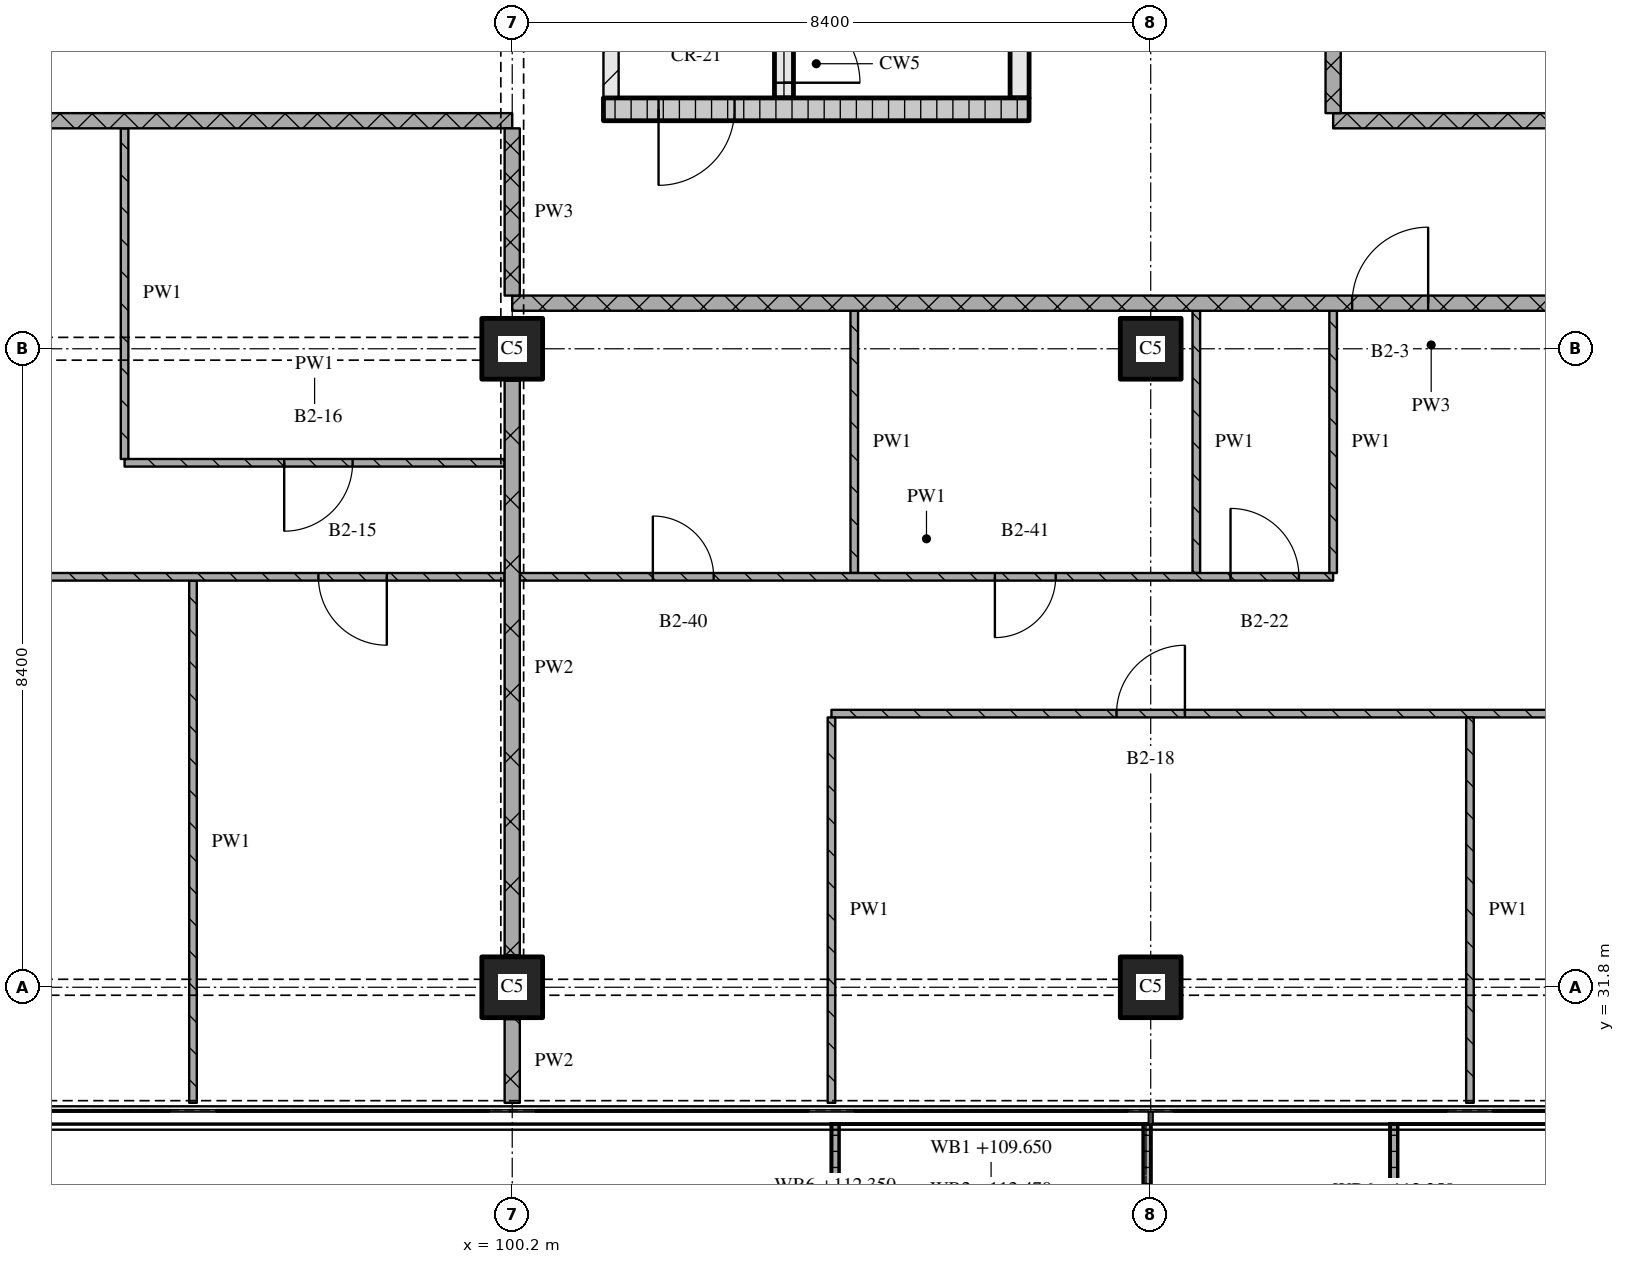
"""IFC4 building model, lengths in metres.
Left out: names, types, materials, properties, quantities, classifications, styles, units other than length and angle.
Written with IfcOpenShell. Run it as: python <this file> out.ifc"""

import sys

from ifc_helpers import new_model, si_unit, direction, frame, frame_2d, origin, origin_2d, place, context, subcontext, project, spatial, polyline, rectangle, outline, extrude, element, fill, save


model = new_model("IFC4")
c1 = context("Model", 3, precision=1e-05, world=origin(), true_north=direction((0.0, 1.0)))
c2 = subcontext(c1, "Body", "Model", "MODEL_VIEW")
j1 = project(units=[si_unit("LENGTHUNIT", "METRE"), si_unit("PLANEANGLEUNIT", "RADIAN")], contexts=[c1])
p1 = place(None, origin())
s1 = spatial("IfcSite", under=j1, at=p1, CompositionType="ELEMENT")
p2 = place(p1, origin())
s2 = spatial("IfcBuilding", under=s1, at=p2, CompositionType="ELEMENT")
p3 = place(p2, frame((0.0, 0.0, 109.65)))
s3 = spatial("IfcBuildingStorey", under=s2, at=p3, CompositionType="ELEMENT", Elevation=109.65)
for number, where, z_axis, x_axis in (
    (1, (100.2, 31.8, 0.0), (0.0, 0.0, 1.0), (1.0, 0.0, 0.0)),
    (2, (100.2, 40.2, 0.0), (0.0, 0.0, 1.0), (1.0, 0.0, 0.0)),
    (3, (108.6, 31.8, 0.0), (0.0, 0.0, 1.0), (1.0, 0.0, 0.0)),
    (4, (108.6, 40.2, 0.0), (0.0, 0.0, 1.0), (1.0, 0.0, 0.0)),
):
    element("IfcColumn", number, at=place(p3, frame(where, z_axis=z_axis, x_axis=x_axis)), inside=s3, PredefinedType="COLUMN", context=c2, shape_type="SweptSolid", body=[
        extrude(rectangle(XDim=0.8, YDim=0.8, at=origin_2d()), origin(), (0.0, 0.0, 1.0), 3.6),
    ])
p4 = place(p3, origin())
e5 = element("IfcWall", 5, at=p4, inside=s3, PredefinedType="SOLIDWALL", context=c2, shape_type="SweptSolid", body=[
    extrude(outline(polyline([(104.4, 30.0), (104.5, 30.0), (104.5, 28.367), (108.5, 28.367), (108.5, 30.0), (108.6, 30.0), (108.6, 28.267), (104.4, 28.267), (104.4, 30.0)])), origin(), (0.0, 0.0, 1.0), 1.0),
])
p5 = place(p3, origin())
e6 = element("IfcWall", 6, at=p5, inside=s3, PredefinedType="SOLIDWALL", context=c2, shape_type="SweptSolid", body=[
    extrude(outline(polyline([(111.75, 30.0), (111.85, 30.0), (111.85, 28.233), (117.95, 28.233), (117.95, 30.0), (118.05, 30.0), (118.05, 28.133), (111.75, 28.133), (111.75, 30.0)])), origin(), (0.0, 0.0, 1.0), 1.0),
])
p6 = place(p3, frame((101.4, 43.35, 0.0), z_axis=(0.0, 0.0, 1.0), x_axis=(1.0, 0.0, 0.0)))
e7 = element("IfcWall", 7, at=p6, inside=s3, PredefinedType="SOLIDWALL", context=c2, shape_type="SweptSolid", body=[
    extrude(rectangle(XDim=5.6, YDim=0.3, at=frame_2d((2.8, 0.0))), origin(), (0.0, 0.0, 1.0), 3.32),
])
p7 = place(p6, frame((0.725, 0.0, 0.0)))
e8 = element("IfcOpeningElement", 8, at=p7, cuts=e7, PredefinedType="OPENING", context=c2, shape_type="SweptSolid", body=[
    extrude(rectangle(XDim=1.0, YDim=2.1, at=frame_2d((0.5, 1.05))), frame((0.0, 0.16, 0.0), z_axis=(0.0, -1.0, 0.0), x_axis=(1.0, 0.0, 0.0)), (0.0, 0.0, 1.0), 0.32),
])
p8 = place(p3, frame((101.5, 43.5, 0.0), z_axis=(0.0, 0.0, 1.0), x_axis=(0.0, 1.0, 0.0)))
e9 = element("IfcWall", 9, at=p8, inside=s3, PredefinedType="PARTITIONING", context=c2, shape_type="SweptSolid", body=[
    extrude(rectangle(XDim=6.9, YDim=0.2, at=frame_2d((3.45, 0.0))), origin(), (0.0, 0.0, 1.0), 3.32),
])
p9 = place(p8, frame((1.0, 0.0, 0.0)))
e10 = element("IfcOpeningElement", 10, at=p9, cuts=e9, PredefinedType="OPENING", context=c2, shape_type="SweptSolid", body=[
    extrude(rectangle(XDim=1.0, YDim=2.1, at=frame_2d((0.5, 1.05))), frame((0.0, 0.11, 0.0), z_axis=(0.0, -1.0, 0.0), x_axis=(1.0, 0.0, 0.0)), (0.0, 0.0, 1.0), 0.22),
])
p10 = place(p3, frame((103.775, 43.5, 0.0), z_axis=(0.0, 0.0, 1.0), x_axis=(0.0, 1.0, 0.0)))
e11 = element("IfcWall", 11, at=p10, inside=s3, PredefinedType="SOLIDWALL", context=c2, shape_type="SweptSolid", body=[
    extrude(rectangle(XDim=6.9, YDim=0.25, at=frame_2d((3.45, 0.0))), origin(), (0.0, 0.0, 1.0), 3.32),
])
p11 = place(p10, frame((0.2, 0.0, 0.0)))
e12 = element("IfcOpeningElement", 12, at=p11, cuts=e11, PredefinedType="OPENING", context=c2, shape_type="SweptSolid", body=[
    extrude(rectangle(XDim=1.0, YDim=2.1, at=frame_2d((0.5, 1.05))), frame((0.0, 0.135, 0.0), z_axis=(0.0, -1.0, 0.0), x_axis=(1.0, 0.0, 0.0)), (0.0, 0.0, 1.0), 0.27),
])
p12 = place(p3, frame((106.875, 43.5, 0.0), z_axis=(0.0, 0.0, 1.0), x_axis=(0.0, 1.0, 0.0)))
e13 = element("IfcWall", 13, at=p12, inside=s3, PredefinedType="SOLIDWALL", context=c2, shape_type="SweptSolid", body=[
    extrude(rectangle(XDim=6.9, YDim=0.25, at=frame_2d((3.45, 0.0))), origin(), (0.0, 0.0, 1.0), 3.32),
])
p13 = place(p3, frame((126.92, 35.4, 0.0), z_axis=(0.0, 0.0, 1.0), x_axis=(-1.0, 0.0, 0.0)))
e14 = element("IfcWall", 14, at=p13, inside=s3, PredefinedType="PARTITIONING", context=c2, shape_type="SweptSolid", body=[
    extrude(rectangle(XDim=22.52, YDim=0.1, at=frame_2d((11.26, 0.0))), origin(), (0.0, 0.0, 1.0), 3.32),
])
p14 = place(p13, frame((3.346, 0.0, 0.0)))
e15 = element("IfcOpeningElement", 15, at=p14, cuts=e14, PredefinedType="OPENING", context=c2, shape_type="SweptSolid", body=[
    extrude(rectangle(XDim=0.9, YDim=2.1, at=frame_2d((0.45, 1.05))), frame((0.0, 0.06, 0.0), z_axis=(0.0, -1.0, 0.0), x_axis=(1.0, 0.0, 0.0)), (0.0, 0.0, 1.0), 0.12),
])
p15 = place(p13, frame((9.47, 0.0, 0.0)))
e16 = element("IfcOpeningElement", 16, at=p15, cuts=e14, PredefinedType="OPENING", context=c2, shape_type="SweptSolid", body=[
    extrude(rectangle(XDim=0.9, YDim=2.1, at=frame_2d((0.45, 1.05))), frame((0.0, 0.06, 0.0), z_axis=(0.0, -1.0, 0.0), x_axis=(1.0, 0.0, 0.0)), (0.0, 0.0, 1.0), 0.12),
])
p16 = place(p13, frame((17.87, 0.0, 0.0)))
e17 = element("IfcOpeningElement", 17, at=p16, cuts=e14, PredefinedType="OPENING", context=c2, shape_type="SweptSolid", body=[
    extrude(rectangle(XDim=0.9, YDim=2.1, at=frame_2d((0.45, 1.05))), frame((0.0, 0.06, 0.0), z_axis=(0.0, -1.0, 0.0), x_axis=(1.0, 0.0, 0.0)), (0.0, 0.0, 1.0), 0.12),
])
p17 = place(p3, frame((95.1, 38.7, 0.0), z_axis=(0.0, 0.0, 1.0), x_axis=(1.0, 0.0, 0.0)))
e18 = element("IfcWall", 18, at=p17, inside=s3, PredefinedType="PARTITIONING", context=c2, shape_type="SweptSolid", body=[
    extrude(rectangle(XDim=5.0, YDim=0.1, at=frame_2d((2.5, 0.0))), origin(), (0.0, 0.0, 1.0), 3.32),
])
p18 = place(p17, frame((2.1, 0.0, 0.0)))
e19 = element("IfcOpeningElement", 19, at=p18, cuts=e18, PredefinedType="OPENING", context=c2, shape_type="SweptSolid", body=[
    extrude(rectangle(XDim=0.9, YDim=2.1, at=frame_2d((0.45, 1.05))), frame((0.0, 0.06, 0.0), z_axis=(0.0, -1.0, 0.0), x_axis=(1.0, 0.0, 0.0)), (0.0, 0.0, 1.0), 0.12),
])
p19 = place(p3, frame((124.38, 40.8, 0.0), z_axis=(0.0, 0.0, 1.0), x_axis=(-1.0, 0.0, 0.0)))
e20 = element("IfcWall", 20, at=p19, inside=s3, PredefinedType="PARTITIONING", context=c2, shape_type="SweptSolid", body=[
    extrude(rectangle(XDim=24.18, YDim=0.2, at=frame_2d((12.09, 0.0))), origin(), (0.0, 0.0, 1.0), 3.32),
])
p20 = place(p19, frame((12.13, 0.0, 0.0)))
e21 = element("IfcOpeningElement", 21, at=p20, cuts=e20, PredefinedType="OPENING", context=c2, shape_type="SweptSolid", body=[
    extrude(rectangle(XDim=1.0, YDim=2.1, at=frame_2d((0.5, 1.05))), frame((0.0, 0.11, 0.0), z_axis=(0.0, -1.0, 0.0), x_axis=(1.0, 0.0, 0.0)), (0.0, 0.0, 1.0), 0.22),
])
p21 = place(p3, frame((100.2, 43.2, 0.0), z_axis=(0.0, 0.0, 1.0), x_axis=(-1.0, 0.0, 0.0)))
e22 = element("IfcWall", 22, at=p21, inside=s3, PredefinedType="PARTITIONING", context=c2, shape_type="SweptSolid", body=[
    extrude(rectangle(XDim=25.2, YDim=0.2, at=frame_2d((12.6, 0.0))), origin(), (0.0, 0.0, 1.0), 3.32),
])
p22 = place(p21, frame((12.85, 0.0, 0.0)))
e23 = element("IfcOpeningElement", 23, at=p22, cuts=e22, PredefinedType="OPENING", context=c2, shape_type="SweptSolid", body=[
    extrude(rectangle(XDim=1.0, YDim=2.1, at=frame_2d((0.5, 1.05))), frame((0.0, 0.11, 0.0), z_axis=(0.0, -1.0, 0.0), x_axis=(1.0, 0.0, 0.0)), (0.0, 0.0, 1.0), 0.22),
])
p23 = place(p3, frame((111.0, 43.2, 0.0), z_axis=(0.0, 0.0, 1.0), x_axis=(1.0, 0.0, 0.0)))
e24 = element("IfcWall", 24, at=p23, inside=s3, PredefinedType="PARTITIONING", context=c2, shape_type="SweptSolid", body=[
    extrude(rectangle(XDim=15.92, YDim=0.2, at=frame_2d((7.96, 0.0))), origin(), (0.0, 0.0, 1.0), 3.32),
])
p24 = place(p3, frame((95.1, 43.1, 0.0), z_axis=(0.0, 0.0, 1.0), x_axis=(0.0, -1.0, 0.0)))
e25 = element("IfcWall", 25, at=p24, inside=s3, PredefinedType="PARTITIONING", context=c2, shape_type="SweptSolid", body=[
    extrude(rectangle(XDim=4.35, YDim=0.1, at=frame_2d((2.175, 0.0))), origin(), (0.0, 0.0, 1.0), 3.32),
])
p25 = place(p3, frame((96.0, 37.15, 0.0), z_axis=(0.0, 0.0, 1.0), x_axis=(0.0, -1.0, 0.0)))
e26 = element("IfcWall", 26, at=p25, inside=s3, PredefinedType="PARTITIONING", context=c2, shape_type="SweptSolid", body=[
    extrude(rectangle(XDim=6.87, YDim=0.1, at=frame_2d((3.435, 0.0))), origin(), (0.0, 0.0, 1.0), 3.32),
])
p26 = place(p3, frame((100.2, 43.1, 0.0), z_axis=(0.0, 0.0, 1.0), x_axis=(0.0, -1.0, 0.0)))
e27 = element("IfcWall", 27, at=p26, inside=s3, PredefinedType="PARTITIONING", context=c2, shape_type="SweptSolid", body=[
    extrude(rectangle(XDim=2.2, YDim=0.2, at=frame_2d((1.1, 0.0))), origin(), (0.0, 0.0, 1.0), 2.43),
])
p27 = place(p3, frame((100.2, 31.38, 0.0), z_axis=(0.0, 0.0, 1.0), x_axis=(0.0, -1.0, 0.0)))
e28 = element("IfcWall", 28, at=p27, inside=s3, PredefinedType="PARTITIONING", context=c2, shape_type="SweptSolid", body=[
    extrude(rectangle(XDim=1.1, YDim=0.2, at=frame_2d((0.55, 0.0))), origin(), (0.0, 0.0, 1.0), 3.32),
])
p28 = place(p3, frame((100.2, 39.78, 0.0), z_axis=(0.0, 0.0, 1.0), x_axis=(0.0, -1.0, 0.0)))
e29 = element("IfcWall", 29, at=p28, inside=s3, PredefinedType="PARTITIONING", context=c2, shape_type="SweptSolid", body=[
    extrude(rectangle(XDim=7.56, YDim=0.2, at=frame_2d((3.78, 0.0))), origin(), (0.0, 0.0, 1.0), 2.83),
])
p29 = place(p3, frame((104.4, 35.35, 0.0), z_axis=(0.0, 0.0, 1.0), x_axis=(0.0, -1.0, 0.0)))
e30 = element("IfcWall", 30, at=p29, inside=s3, PredefinedType="PARTITIONING", context=c2, shape_type="SweptSolid", body=[
    extrude(rectangle(XDim=5.07, YDim=0.1, at=frame_2d((2.535, 0.0))), origin(), (0.0, 0.0, 1.0), 3.32),
])
for number, where, z_axis, x_axis in (
    (31, (104.7, 40.7, 0.0), (0.0, 0.0, 1.0), (0.0, -1.0, 0.0)),
    (32, (109.2, 40.7, 0.0), (0.0, 0.0, 1.0), (0.0, -1.0, 0.0)),
):
    element("IfcWall", number, at=place(p3, frame(where, z_axis=z_axis, x_axis=x_axis)), inside=s3, PredefinedType="PARTITIONING", context=c2, shape_type="SweptSolid", body=[
        extrude(rectangle(XDim=3.45, YDim=0.1, at=frame_2d((1.725, 0.0))), origin(), (0.0, 0.0, 1.0), 3.32),
    ])
p30 = place(p3, frame((111.0, 75.32, 0.0), z_axis=(0.0, 0.0, 1.0), x_axis=(0.0, -1.0, 0.0)))
e33 = element("IfcWall", 33, at=p30, inside=s3, PredefinedType="PARTITIONING", context=c2, shape_type="SweptSolid", body=[
    extrude(rectangle(XDim=32.02, YDim=0.2, at=frame_2d((16.01, 0.0))), origin(), (0.0, 0.0, 1.0), 3.32),
])
p31 = place(p30, frame((3.87, 0.0, 0.0)))
e34 = element("IfcOpeningElement", 34, at=p31, cuts=e33, PredefinedType="OPENING", context=c2, shape_type="SweptSolid", body=[
    extrude(rectangle(XDim=1.0, YDim=2.1, at=frame_2d((0.5, 1.05))), frame((0.0, 0.11, 0.0), z_axis=(0.0, -1.0, 0.0), x_axis=(1.0, 0.0, 0.0)), (0.0, 0.0, 1.0), 0.22),
])
p32 = place(p30, frame((20.67, 0.0, 0.0)))
e35 = element("IfcOpeningElement", 35, at=p32, cuts=e33, PredefinedType="OPENING", context=c2, shape_type="SweptSolid", body=[
    extrude(rectangle(XDim=1.0, YDim=2.1, at=frame_2d((0.5, 1.05))), frame((0.0, 0.11, 0.0), z_axis=(0.0, -1.0, 0.0), x_axis=(1.0, 0.0, 0.0)), (0.0, 0.0, 1.0), 0.22),
])
p33 = place(p3, frame((111.0, 40.7, 0.0), z_axis=(0.0, 0.0, 1.0), x_axis=(0.0, -1.0, 0.0)))
e36 = element("IfcWall", 36, at=p33, inside=s3, PredefinedType="PARTITIONING", context=c2, shape_type="SweptSolid", body=[
    extrude(rectangle(XDim=3.45, YDim=0.1, at=frame_2d((1.725, 0.0))), origin(), (0.0, 0.0, 1.0), 3.32),
])
p34 = place(p3, frame((112.8, 35.35, 0.0), z_axis=(0.0, 0.0, 1.0), x_axis=(0.0, -1.0, 0.0)))
e37 = element("IfcWall", 37, at=p34, inside=s3, PredefinedType="PARTITIONING", context=c2, shape_type="SweptSolid", body=[
    extrude(rectangle(XDim=5.07, YDim=0.1, at=frame_2d((2.535, 0.0))), origin(), (0.0, 0.0, 1.0), 3.32),
])
p35 = place(p3, frame((100.1, 37.2, 0.0), z_axis=(0.0, 0.0, 1.0), x_axis=(-1.0, 0.0, 0.0)))
e38 = element("IfcWall", 38, at=p35, inside=s3, PredefinedType="PARTITIONING", context=c2, shape_type="SweptSolid", body=[
    extrude(rectangle(XDim=12.5, YDim=0.1, at=frame_2d((6.25, 0.0))), origin(), (0.0, 0.0, 1.0), 3.32),
])
p36 = place(p35, frame((1.55, 0.0, 0.0)))
e39 = element("IfcOpeningElement", 39, at=p36, cuts=e38, PredefinedType="OPENING", context=c2, shape_type="SweptSolid", body=[
    extrude(rectangle(XDim=0.9, YDim=2.1, at=frame_2d((0.45, 1.05))), frame((0.0, 0.06, 0.0), z_axis=(0.0, -1.0, 0.0), x_axis=(1.0, 0.0, 0.0)), (0.0, 0.0, 1.0), 0.12),
])
p37 = place(p35, frame((7.85, 0.0, 0.0)))
e40 = element("IfcOpeningElement", 40, at=p37, cuts=e38, PredefinedType="OPENING", context=c2, shape_type="SweptSolid", body=[
    extrude(rectangle(XDim=0.9, YDim=2.1, at=frame_2d((0.45, 1.05))), frame((0.0, 0.06, 0.0), z_axis=(0.0, -1.0, 0.0), x_axis=(1.0, 0.0, 0.0)), (0.0, 0.0, 1.0), 0.12),
])
p38 = place(p3, frame((100.3, 37.2, 0.0), z_axis=(0.0, 0.0, 1.0), x_axis=(1.0, 0.0, 0.0)))
e41 = element("IfcWall", 41, at=p38, inside=s3, PredefinedType="PARTITIONING", context=c2, shape_type="SweptSolid", body=[
    extrude(rectangle(XDim=10.7, YDim=0.1, at=frame_2d((5.35, 0.0))), origin(), (0.0, 0.0, 1.0), 3.32),
])
p39 = place(p38, frame((1.75, 0.0, 0.0)))
e42 = element("IfcOpeningElement", 42, at=p39, cuts=e41, PredefinedType="OPENING", context=c2, shape_type="SweptSolid", body=[
    extrude(rectangle(XDim=0.8, YDim=2.1, at=frame_2d((0.4, 1.05))), frame((0.0, 0.06, 0.0), z_axis=(0.0, -1.0, 0.0), x_axis=(1.0, 0.0, 0.0)), (0.0, 0.0, 1.0), 0.12),
])
p40 = place(p38, frame((6.25, 0.0, 0.0)))
e43 = element("IfcOpeningElement", 43, at=p40, cuts=e41, PredefinedType="OPENING", context=c2, shape_type="SweptSolid", body=[
    extrude(rectangle(XDim=0.8, YDim=2.1, at=frame_2d((0.4, 1.05))), frame((0.0, 0.06, 0.0), z_axis=(0.0, -1.0, 0.0), x_axis=(1.0, 0.0, 0.0)), (0.0, 0.0, 1.0), 0.12),
])
p41 = place(p38, frame((9.35, 0.0, 0.0)))
e44 = element("IfcOpeningElement", 44, at=p41, cuts=e41, PredefinedType="OPENING", context=c2, shape_type="SweptSolid", body=[
    extrude(rectangle(XDim=0.9, YDim=2.1, at=frame_2d((0.45, 1.05))), frame((0.0, 0.06, 0.0), z_axis=(0.0, -1.0, 0.0), x_axis=(1.0, 0.0, 0.0)), (0.0, 0.0, 1.0), 0.12),
])
p42 = place(p7, origin())
e45 = element("IfcDoor", 45, at=p42, inside=s3, OperationType="SINGLE_SWING_RIGHT", PredefinedType="DOOR", context=c2, shape_type="SweptSolid", body=[
    extrude(rectangle(XDim=1.0, YDim=2.1, at=frame_2d((0.5, 1.05))), frame((0.0, 0.025, 0.0), z_axis=(0.0, -1.0, 0.0), x_axis=(1.0, 0.0, 0.0)), (0.0, 0.0, 1.0), 0.05),
])
fill(e8, e45)
p43 = place(p11, origin())
e46 = element("IfcDoor", 46, at=p43, inside=s3, OperationType="SINGLE_SWING_RIGHT", PredefinedType="DOOR", context=c2, shape_type="SweptSolid", body=[
    extrude(rectangle(XDim=1.0, YDim=2.1, at=frame_2d((0.5, 1.05))), frame((0.0, 0.025, 0.0), z_axis=(0.0, -1.0, 0.0), x_axis=(1.0, 0.0, 0.0)), (0.0, 0.0, 1.0), 0.05),
])
fill(e12, e46)
p44 = place(p16, origin())
e47 = element("IfcDoor", 47, at=p44, inside=s3, OperationType="SINGLE_SWING_RIGHT", PredefinedType="DOOR", context=c2, shape_type="SweptSolid", body=[
    extrude(rectangle(XDim=0.9, YDim=2.1, at=frame_2d((0.45, 1.05))), frame((0.0, 0.025, 0.0), z_axis=(0.0, -1.0, 0.0), x_axis=(1.0, 0.0, 0.0)), (0.0, 0.0, 1.0), 0.05),
])
fill(e17, e47)
p45 = place(p18, origin())
e48 = element("IfcDoor", 48, at=p45, inside=s3, OperationType="SINGLE_SWING_RIGHT", PredefinedType="DOOR", context=c2, shape_type="SweptSolid", body=[
    extrude(rectangle(XDim=0.9, YDim=2.1, at=frame_2d((0.45, 1.05))), frame((0.0, 0.025, 0.0), z_axis=(0.0, -1.0, 0.0), x_axis=(1.0, 0.0, 0.0)), (0.0, 0.0, 1.0), 0.05),
])
fill(e19, e48)
p46 = place(p20, origin())
e49 = element("IfcDoor", 49, at=p46, inside=s3, OperationType="SINGLE_SWING_RIGHT", PredefinedType="DOOR", context=c2, shape_type="SweptSolid", body=[
    extrude(rectangle(XDim=1.0, YDim=2.1, at=frame_2d((0.5, 1.05))), frame((0.0, 0.025, 0.0), z_axis=(0.0, -1.0, 0.0), x_axis=(1.0, 0.0, 0.0)), (0.0, 0.0, 1.0), 0.05),
])
fill(e21, e49)
p47 = place(p36, origin())
e50 = element("IfcDoor", 50, at=p47, inside=s3, OperationType="SINGLE_SWING_LEFT", PredefinedType="DOOR", context=c2, shape_type="SweptSolid", body=[
    extrude(rectangle(XDim=0.9, YDim=2.1, at=frame_2d((0.45, 1.05))), frame((0.0, 0.025, 0.0), z_axis=(0.0, -1.0, 0.0), x_axis=(1.0, 0.0, 0.0)), (0.0, 0.0, 1.0), 0.05),
])
fill(e39, e50)
p48 = place(p39, origin())
e51 = element("IfcDoor", 51, at=p48, inside=s3, OperationType="SINGLE_SWING_LEFT", PredefinedType="DOOR", context=c2, shape_type="SweptSolid", body=[
    extrude(rectangle(XDim=0.8, YDim=2.1, at=frame_2d((0.4, 1.05))), frame((0.0, 0.025, 0.0), z_axis=(0.0, -1.0, 0.0), x_axis=(1.0, 0.0, 0.0)), (0.0, 0.0, 1.0), 0.05),
])
fill(e42, e51)
p49 = place(p40, origin())
e52 = element("IfcDoor", 52, at=p49, inside=s3, OperationType="SINGLE_SWING_RIGHT", PredefinedType="DOOR", context=c2, shape_type="SweptSolid", body=[
    extrude(rectangle(XDim=0.8, YDim=2.1, at=frame_2d((0.4, 1.05))), frame((0.0, 0.025, 0.0), z_axis=(0.0, -1.0, 0.0), x_axis=(1.0, 0.0, 0.0)), (0.0, 0.0, 1.0), 0.05),
])
fill(e43, e52)
p50 = place(p41, origin())
e53 = element("IfcDoor", 53, at=p50, inside=s3, OperationType="SINGLE_SWING_LEFT", PredefinedType="DOOR", context=c2, shape_type="SweptSolid", body=[
    extrude(rectangle(XDim=0.9, YDim=2.1, at=frame_2d((0.45, 1.05))), frame((0.0, 0.025, 0.0), z_axis=(0.0, -1.0, 0.0), x_axis=(1.0, 0.0, 0.0)), (0.0, 0.0, 1.0), 0.05),
])
fill(e44, e53)
save(model, sys.argv[1])
